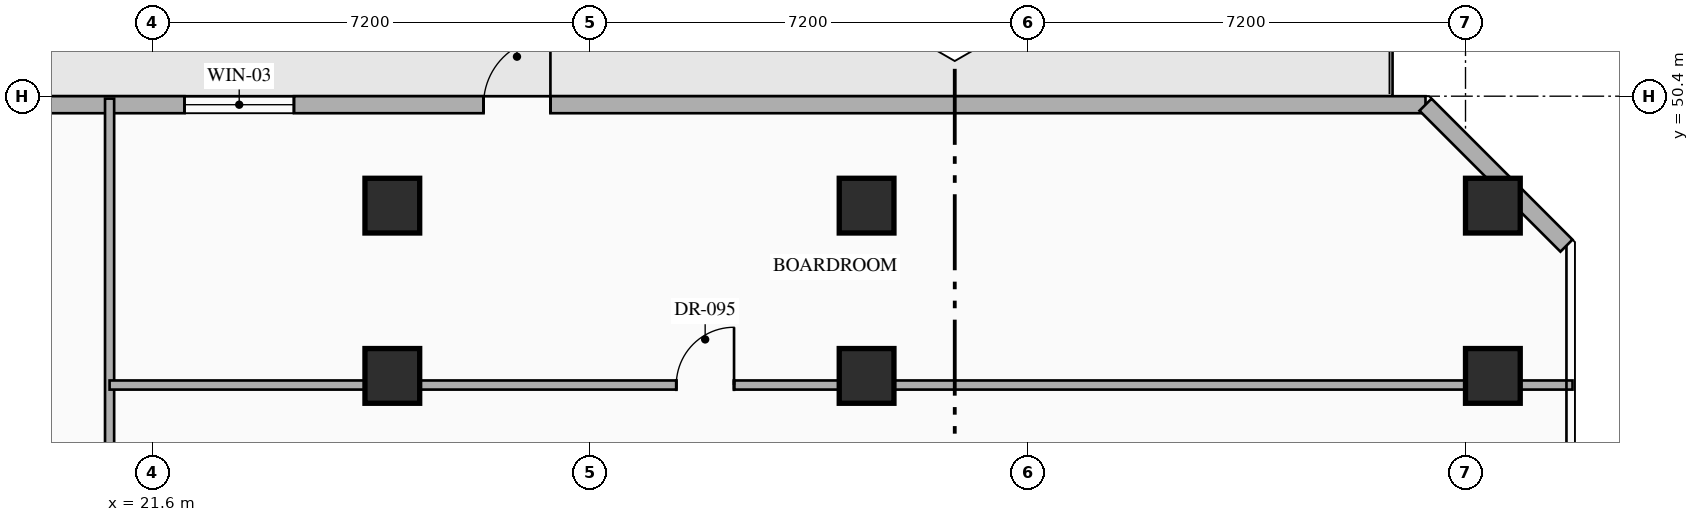
"""IFC4 building model, lengths in metres.
Left out: names, types, materials, properties, quantities, classifications, styles, units other than length and angle.
Written with IfcOpenShell. Run it as: python <this file> out.ifc"""

import sys

from ifc_helpers import new_model, si_unit, direction, frame, frame_2d, origin, origin_2d, place, context, subcontext, project, spatial, rectangle, hollow_rectangle, extrude, element, fill, save


model = new_model("IFC4")
c1 = context("Model", 3, precision=1e-05, world=origin(), true_north=direction((0.0, 1.0)))
c2 = subcontext(c1, "Body", "Model", "MODEL_VIEW")
j1 = project(units=[si_unit("LENGTHUNIT", "METRE"), si_unit("PLANEANGLEUNIT", "RADIAN")], contexts=[c1])
p1 = place(None, origin())
s1 = spatial("IfcSite", under=j1, at=p1, CompositionType="ELEMENT")
p2 = place(p1, origin())
s2 = spatial("IfcBuilding", under=s1, at=p2, CompositionType="ELEMENT")
p3 = place(p2, frame((0.0, 0.0, 115.65)))
s3 = spatial("IfcBuildingStorey", under=s2, at=p3, CompositionType="ELEMENT", Elevation=115.65)
for number, where, z_axis, x_axis in (
    (1, (25.55, 45.8, 0.0), (0.0, 0.0, 1.0), (1.0, 0.0, 0.0)),
    (2, (33.35, 45.8, 0.0), (0.0, 0.0, 1.0), (1.0, 0.0, 0.0)),
    (3, (43.65, 45.8, 0.0), (0.0, 0.0, 1.0), (1.0, 0.0, 0.0)),
    (4, (25.55, 48.6, 0.0), (0.0, 0.0, 1.0), (1.0, 0.0, 0.0)),
    (5, (33.35, 48.6, 0.0), (0.0, 0.0, 1.0), (1.0, 0.0, 0.0)),
    (6, (43.65, 48.6, 0.0), (0.0, 0.0, 1.0), (1.0, 0.0, 0.0)),
):
    element("IfcColumn", number, at=place(p3, frame(where, z_axis=z_axis, x_axis=x_axis)), inside=s3, PredefinedType="COLUMN", context=c2, shape_type="SweptSolid", body=[
        extrude(hollow_rectangle(XDim=0.9, YDim=0.9, WallThickness=0.036, at=origin_2d()), origin(), (0.0, 0.0, 1.0), 3.6),
    ])
p4 = place(p3, frame((12.058, 50.26, 0.0), z_axis=(0.0, 0.0, 1.0), x_axis=(1.0, 0.0, 0.0)))
e7 = element("IfcWall", 7, at=p4, inside=s3, PredefinedType="STANDARD", context=c2, shape_type="SweptSolid", body=[
    extrude(rectangle(XDim=30.484, YDim=0.28, at=frame_2d((15.242, 0.0))), origin(), (0.0, 0.0, 1.0), 3.35),
])
p5 = place(p4, frame((14.992, 0.0, 0.0)))
e8 = element("IfcOpeningElement", 8, at=p5, cuts=e7, PredefinedType="OPENING", context=c2, shape_type="SweptSolid", body=[
    extrude(rectangle(XDim=1.1, YDim=2.2, at=frame_2d((0.55, 1.1))), frame((0.0, 0.15, 0.0), z_axis=(0.0, -1.0, 0.0), x_axis=(1.0, 0.0, 0.0)), (0.0, 0.0, 1.0), 0.3),
])
p6 = place(p4, frame((10.074, 0.0, 0.85)))
e9 = element("IfcOpeningElement", 9, at=p6, cuts=e7, PredefinedType="OPENING", context=c2, shape_type="SweptSolid", body=[
    extrude(rectangle(XDim=1.8, YDim=2.1, at=frame_2d((0.9, 1.05))), frame((0.0, 0.15, 0.0), z_axis=(0.0, -1.0, 0.0), x_axis=(1.0, 0.0, 0.0)), (0.0, 0.0, 1.0), 0.3),
])
p7 = place(p3, frame((42.542, 50.26, 0.0), z_axis=(0.0, 0.0, 1.0), x_axis=(0.707106781187, -0.707106781187, 0.0)))
e10 = element("IfcWall", 10, at=p7, inside=s3, PredefinedType="STANDARD", context=c2, shape_type="SweptSolid", body=[
    extrude(rectangle(XDim=3.278, YDim=0.28, at=frame_2d((1.639, 0.0))), origin(), (0.0, 0.0, 1.0), 3.35),
])
p8 = place(p3, frame((20.9, 23.44, 0.0), z_axis=(0.0, 0.0, 1.0), x_axis=(0.0, 1.0, 0.0)))
e11 = element("IfcWall", 11, at=p8, inside=s3, PredefinedType="PARTITIONING", context=c2, shape_type="SweptSolid", body=[
    extrude(rectangle(XDim=26.92, YDim=0.15, at=frame_2d((13.46, 0.0))), origin(), (0.0, 0.0, 1.0), 3.35),
])
p9 = place(p8, frame((7.943, 0.0, 0.0)))
e12 = element("IfcOpeningElement", 12, at=p9, cuts=e11, PredefinedType="OPENING", context=c2, shape_type="SweptSolid", body=[
    extrude(rectangle(XDim=0.95, YDim=2.15, at=frame_2d((0.475, 1.075))), frame((0.0, 0.085, 0.0), z_axis=(0.0, -1.0, 0.0), x_axis=(1.0, 0.0, 0.0)), (0.0, 0.0, 1.0), 0.17),
])
p10 = place(p3, frame((20.9, 45.65, 0.0), z_axis=(0.0, 0.0, 1.0), x_axis=(1.0, 0.0, 0.0)))
e13 = element("IfcWall", 13, at=p10, inside=s3, PredefinedType="PARTITIONING", context=c2, shape_type="SweptSolid", body=[
    extrude(rectangle(XDim=24.06, YDim=0.15, at=frame_2d((12.03, 0.0))), origin(), (0.0, 0.0, 1.0), 2.695),
])
p11 = place(p10, frame((9.32, 0.0, 0.0)))
e14 = element("IfcOpeningElement", 14, at=p11, cuts=e13, PredefinedType="OPENING", context=c2, shape_type="SweptSolid", body=[
    extrude(rectangle(XDim=0.95, YDim=2.15, at=frame_2d((0.475, 1.075))), frame((0.0, 0.085, 0.0), z_axis=(0.0, -1.0, 0.0), x_axis=(1.0, 0.0, 0.0)), (0.0, 0.0, 1.0), 0.17),
])
p12 = place(p5, origin())
e15 = element("IfcDoor", 15, at=p12, inside=s3, OperationType="SINGLE_SWING_RIGHT", PredefinedType="DOOR", context=c2, shape_type="SweptSolid", body=[
    extrude(rectangle(XDim=1.1, YDim=2.2, at=frame_2d((0.55, 1.1))), frame((0.0, 0.025, 0.0), z_axis=(0.0, -1.0, 0.0), x_axis=(1.0, 0.0, 0.0)), (0.0, 0.0, 1.0), 0.05),
])
fill(e8, e15)
p13 = place(p6, origin())
e16 = element("IfcWindow", 16, at=p13, inside=s3, PartitioningType="SINGLE_PANEL", PredefinedType="WINDOW", context=c2, shape_type="SweptSolid", body=[
    extrude(rectangle(XDim=1.8, YDim=2.1, at=frame_2d((0.9, 1.05))), frame((0.0, 0.03, 0.0), z_axis=(0.0, -1.0, 0.0), x_axis=(1.0, 0.0, 0.0)), (0.0, 0.0, 1.0), 0.06),
])
fill(e9, e16)
p14 = place(p11, origin())
e17 = element("IfcDoor", 17, at=p14, inside=s3, OperationType="SINGLE_SWING_RIGHT", PredefinedType="DOOR", context=c2, shape_type="SweptSolid", body=[
    extrude(rectangle(XDim=0.95, YDim=2.15, at=frame_2d((0.475, 1.075))), frame((0.0, 0.025, 0.0), z_axis=(0.0, -1.0, 0.0), x_axis=(1.0, 0.0, 0.0)), (0.0, 0.0, 1.0), 0.05),
])
fill(e14, e17)
save(model, sys.argv[1])
